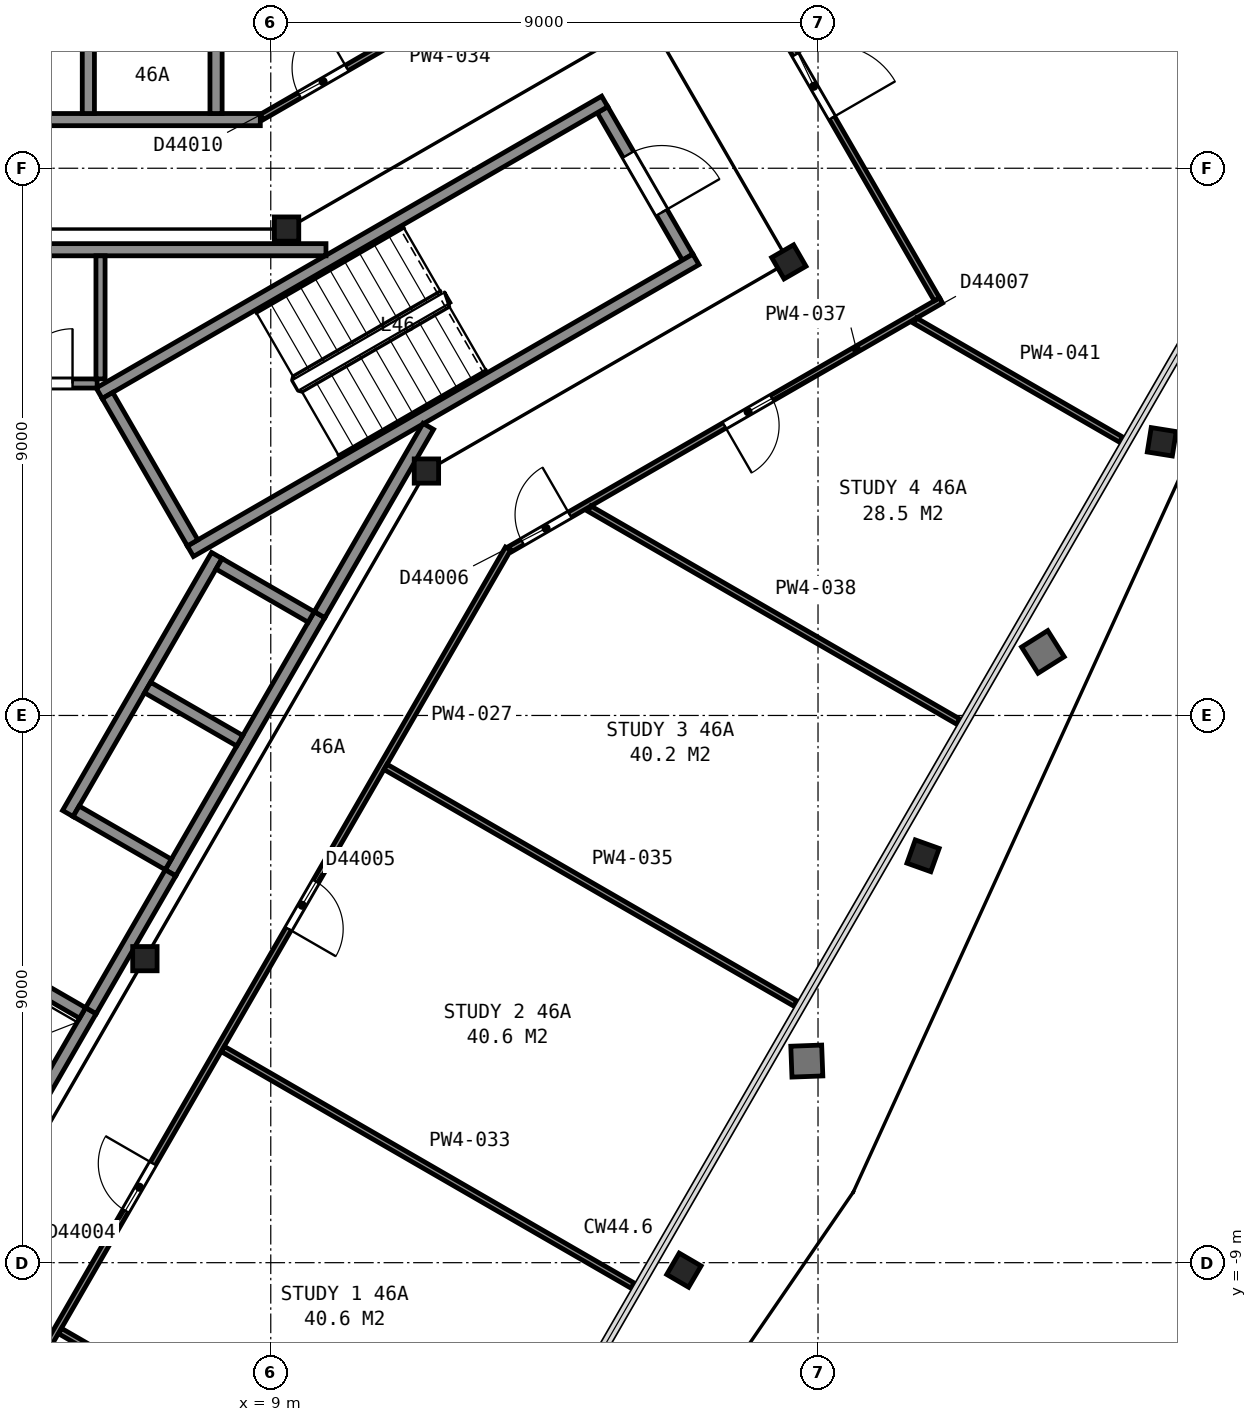
"""IFC4 building model, lengths in metres.
Left out: names, types, materials, properties, quantities, classifications, styles, units other than length and angle.
Written with IfcOpenShell. Run it as: python <this file> out.ifc"""

import sys

from ifc_helpers import new_model, si_unit, direction, frame, frame_2d, origin, origin_2d, place, context, subcontext, project, spatial, rectangle, i_section, extrude, element, fill, save


model = new_model("IFC4")
c1 = context("Model", 3, precision=1e-05, world=origin(), true_north=direction((0.0, 1.0)))
c2 = subcontext(c1, "Body", "Model", "MODEL_VIEW")
j1 = project(units=[si_unit("LENGTHUNIT", "METRE"), si_unit("PLANEANGLEUNIT", "RADIAN")], contexts=[c1])
p1 = place(None, origin())
s1 = spatial("IfcSite", under=j1, at=p1, CompositionType="ELEMENT")
p2 = place(p1, origin())
s2 = spatial("IfcBuilding", under=s1, at=p2, CompositionType="ELEMENT")
p3 = place(p2, frame((0.0, 0.0, 185.8)))
s3 = spatial("IfcBuildingStorey", under=s2, at=p3, CompositionType="ELEMENT", Elevation=185.8)
p4 = place(p3, frame((15.605, -9.013, 0.03), z_axis=(0.159333785609, -0.093016123912, 0.982833020129), x_axis=(-0.500289595457, -0.865857733626, -0.000840117374)))
e1 = element("IfcColumn", 1, at=p4, inside=s3, PredefinedType="COLUMN", context=c2, shape_type="SweptSolid", body=[
    extrude(i_section(OverallWidth=0.406, OverallDepth=0.417, WebThickness=0.03, FlangeThickness=0.048, FilletRadius=0.015, at=origin_2d()), origin(), (0.0, 0.0, 1.0), 3.703),
])
p5 = place(p3, frame((19.516, -2.232, 0.035), z_axis=(0.177790178515, -0.063666319498, 0.982006747525), x_axis=(-0.499620629348, -0.865563464331, 0.034338257757)))
e2 = element("IfcColumn", 2, at=p5, inside=s3, PredefinedType="COLUMN", context=c2, shape_type="SweptSolid", body=[
    extrude(i_section(OverallWidth=0.406, OverallDepth=0.417, WebThickness=0.03, FlangeThickness=0.048, FilletRadius=0.015, at=origin_2d()), origin(), (0.0, 0.0, 1.0), 3.697),
])
p6 = place(p3, frame((23.418, 4.539, 0.04), z_axis=(0.198532076657, -0.031778345714, 0.979579068418), x_axis=(-0.498721760227, -0.86367768571, 0.073057929632)))
e3 = element("IfcColumn", 3, at=p6, inside=s3, PredefinedType="COLUMN", context=c2, shape_type="SweptSolid", body=[
    extrude(i_section(OverallWidth=0.406, OverallDepth=0.417, WebThickness=0.03, FlangeThickness=0.048, FilletRadius=0.015, at=origin_2d()), origin(), (0.0, 0.0, 1.0), 3.695),
])
p7 = place(p3, frame((11.56, 4.02, 0.0), z_axis=(0.0, 0.0, 1.0), x_axis=(1.0, 0.0, 0.0)))
e4 = element("IfcColumn", 4, at=p7, inside=s3, PredefinedType="COLUMN", context=c2, shape_type="SweptSolid", body=[
    extrude(i_section(OverallWidth=0.401, OverallDepth=0.399, WebThickness=0.025, FlangeThickness=0.04, FilletRadius=0.015, at=origin_2d()), origin(), (0.0, 0.0, 1.0), 3.7),
])
p8 = place(p3, frame((17.52, 7.46, 0.0), z_axis=(0.0, 0.0, 1.0), x_axis=(0.5, -0.866025403784, 0.0)))
e5 = element("IfcColumn", 5, at=p8, inside=s3, PredefinedType="COLUMN", context=c2, shape_type="SweptSolid", body=[
    extrude(i_section(OverallWidth=0.406, OverallDepth=0.417, WebThickness=0.03, FlangeThickness=0.048, FilletRadius=0.015, at=origin_2d()), origin(), (0.0, 0.0, 1.0), 3.7),
])
for number, where, z_axis, x_axis in (
    (6, (9.26, 8.0, 0.0), (0.0, 0.0, 1.0), (1.0, 0.0, 0.0)),
    (7, (6.93, -4.0, 0.0), (0.0, 0.0, 1.0), (1.0, 0.0, 0.0)),
):
    element("IfcColumn", number, at=place(p3, frame(where, z_axis=z_axis, x_axis=x_axis)), inside=s3, PredefinedType="COLUMN", context=c2, shape_type="SweptSolid", body=[
        extrude(i_section(OverallWidth=0.401, OverallDepth=0.399, WebThickness=0.025, FlangeThickness=0.04, FilletRadius=0.015, at=origin_2d()), origin(), (0.0, 0.0, 1.0), 3.7),
    ])
p9 = place(p3, frame((15.855, 7.538, 0.0), z_axis=(0.0, 0.0, 1.0), x_axis=(-0.500049511043, 0.865996816683, 0.0)))
e8 = element("IfcWall", 8, at=p9, inside=s3, PredefinedType="PARTITIONING", context=c2, shape_type="SweptSolid", body=[
    extrude(rectangle(XDim=2.8, YDim=0.2, at=frame_2d((1.4, 0.0))), origin(), (0.0, 0.0, 1.0), 3.45),
])
p10 = place(p9, frame((0.85, 0.0, 0.0)))
e9 = element("IfcOpeningElement", 9, at=p10, cuts=e8, PredefinedType="OPENING", context=c2, shape_type="SweptSolid", body=[
    extrude(rectangle(XDim=1.1, YDim=2.1, at=frame_2d((0.55, 1.05))), frame((0.0, 0.11, 0.0), z_axis=(0.0, -1.0, 0.0), x_axis=(1.0, 0.0, 0.0)), (0.0, 0.0, 1.0), 0.22),
])
for number, where, z_axis, x_axis in (
    (10, (6.178, 5.299, 0.0), (0.0, 0.0, 1.0), (0.866, 0.5, 0.0)),
    (11, (7.678, 2.701, 0.0), (0.0, 0.0, 1.0), (0.866, 0.5, 0.0)),
):
    element("IfcWall", number, at=place(p3, frame(where, z_axis=z_axis, x_axis=x_axis)), inside=s3, PredefinedType="PARTITIONING", context=c2, shape_type="SweptSolid", body=[
        extrude(rectangle(XDim=9.6, YDim=0.2, at=frame_2d((4.8, 0.0))), origin(), (0.0, 0.0, 1.0), 3.45),
    ])
p11 = place(p3, frame((7.715, 2.838, 0.0), z_axis=(0.0, 0.0, 1.0), x_axis=(-0.500049511043, 0.865996816683, 0.0)))
e12 = element("IfcWall", 12, at=p11, inside=s3, PredefinedType="PARTITIONING", context=c2, shape_type="SweptSolid", body=[
    extrude(rectangle(XDim=2.8, YDim=0.2, at=frame_2d((1.4, 0.0))), origin(), (0.0, 0.0, 1.0), 3.45),
])
p12 = place(p3, frame((4.766, -7.065, 0.0), z_axis=(0.0, 0.0, 1.0), x_axis=(0.499948979701, 0.866054858364, 0.0)))
e13 = element("IfcWall", 13, at=p12, inside=s3, PredefinedType="PARTITIONING", context=c2, shape_type="SweptSolid", body=[
    extrude(rectangle(XDim=2.55, YDim=0.2, at=frame_2d((1.275, 0.0))), origin(), (0.0, 0.0, 1.0), 3.7),
])
p13 = place(p3, frame((7.351, -2.587, 0.0), z_axis=(0.0, 0.0, 1.0), x_axis=(0.500002801628, 0.866023786258, 0.0)))
e14 = element("IfcWall", 14, at=p13, inside=s3, PredefinedType="PARTITIONING", context=c2, shape_type="SweptSolid", body=[
    extrude(rectangle(XDim=4.9, YDim=0.2, at=frame_2d((2.45, 0.0))), origin(), (0.0, 0.0, 1.0), 3.7),
])
p14 = place(p3, frame((5.663, -1.612, 0.0), z_axis=(0.0, 0.0, 1.0), x_axis=(0.49998122708, 0.866036242063, 0.0)))
e15 = element("IfcWall", 15, at=p14, inside=s3, PredefinedType="PARTITIONING", context=c2, shape_type="SweptSolid", body=[
    extrude(rectangle(XDim=4.9, YDim=0.2, at=frame_2d((2.45, 0.0))), origin(), (0.0, 0.0, 1.0), 3.7),
])
p15 = place(p3, frame((9.665, 1.62, 0.0), z_axis=(0.0, 0.0, 1.0), x_axis=(-0.866002029911, 0.500040482552, 0.0)))
e16 = element("IfcWall", 16, at=p15, inside=s3, PredefinedType="PARTITIONING", context=c2, shape_type="SweptSolid", body=[
    extrude(rectangle(XDim=1.75, YDim=0.2, at=frame_2d((0.875, 0.0))), origin(), (0.0, 0.0, 1.0), 3.7),
])
for number, where, z_axis, x_axis in (
    (17, (8.49, -0.416, 0.0), (0.0, 0.0, 1.0), (-0.866, 0.5, 0.0)),
    (18, (7.315, -2.451, 0.0), (0.0, 0.0, 1.0), (-0.866, 0.5, 0.0)),
):
    element("IfcWall", number, at=place(p3, frame(where, z_axis=z_axis, x_axis=x_axis)), inside=s3, PredefinedType="PARTITIONING", context=c2, shape_type="SweptSolid", body=[
        extrude(rectangle(XDim=1.75, YDim=0.2, at=frame_2d((0.875, 0.0))), origin(), (0.0, 0.0, 1.0), 3.7),
    ])
p16 = place(p3, frame((5.905, -4.893, 0.0), z_axis=(0.0, 0.0, 1.0), x_axis=(-0.866002029911, 0.500040482552, 0.0)))
e19 = element("IfcWall", 19, at=p16, inside=s3, PredefinedType="PARTITIONING", context=c2, shape_type="SweptSolid", body=[
    extrude(rectangle(XDim=1.75, YDim=0.2, at=frame_2d((0.875, 0.0))), origin(), (0.0, 0.0, 1.0), 3.7),
])
p17 = place(p3, frame((-3.933, 7.66, 0.0), z_axis=(0.0, 0.0, 1.0), x_axis=(1.0, 0.0, 0.0)))
e20 = element("IfcWall", 20, at=p17, inside=s3, PredefinedType="PARTITIONING", context=c2, shape_type="SweptSolid", body=[
    extrude(rectangle(XDim=13.841, YDim=0.2, at=frame_2d((6.92, 0.0))), origin(), (0.0, 0.0, 1.0), 3.45),
])
p18 = place(p3, frame((0.925, 5.46, 0.0), z_axis=(0.0, 0.0, 1.0), x_axis=(1.0, 0.0, 0.0)))
e21 = element("IfcWall", 21, at=p18, inside=s3, PredefinedType="PARTITIONING", context=c2, shape_type="SweptSolid", body=[
    extrude(rectangle(XDim=5.22, YDim=0.15, at=frame_2d((2.61, 0.0))), origin(), (0.0, 0.0, 1.0), 3.45),
])
p19 = place(p18, frame((3.915, 0.0, 0.0)))
e22 = element("IfcOpeningElement", 22, at=p19, cuts=e21, PredefinedType="OPENING", context=c2, shape_type="SweptSolid", body=[
    extrude(rectangle(XDim=0.9, YDim=2.1, at=frame_2d((0.45, 1.05))), frame((0.0, 0.085, 0.0), z_axis=(0.0, -1.0, 0.0), x_axis=(1.0, 0.0, 0.0)), (0.0, 0.0, 1.0), 0.17),
])
p20 = place(p3, frame((6.042, -4.855, 0.0), z_axis=(0.0, 0.0, 1.0), x_axis=(0.500252727967, 0.865879442048, 0.0)))
e23 = element("IfcWall", 23, at=p20, inside=s3, PredefinedType="PARTITIONING", context=c2, shape_type="SweptSolid", body=[
    extrude(rectangle(XDim=2.617, YDim=0.2, at=frame_2d((1.309, 0.0))), origin(), (0.0, 0.0, 1.0), 3.45),
])
p21 = place(p3, frame((6.2, 5.535, 0.0), z_axis=(0.0, 0.0, 1.0), x_axis=(0.0, 1.0, 0.0)))
e24 = element("IfcWall", 24, at=p21, inside=s3, PredefinedType="PARTITIONING", context=c2, shape_type="SweptSolid", body=[
    extrude(rectangle(XDim=2.025, YDim=0.15, at=frame_2d((1.013, 0.0))), origin(), (0.0, 0.0, 1.0), 3.45),
])
p22 = place(p3, frame((9.803, 1.658, 0.0), z_axis=(0.0, 0.0, 1.0), x_axis=(0.499943114462, 0.866058244174, 0.0)))
e25 = element("IfcWall", 25, at=p22, inside=s3, PredefinedType="PARTITIONING", context=c2, shape_type="SweptSolid", body=[
    extrude(rectangle(XDim=3.576, YDim=0.2, at=frame_2d((1.788, 0.0))), origin(), (0.0, 0.0, 1.0), 3.45),
])
p23 = place(p3, frame((-8.828, 9.8, 0.0), z_axis=(0.0, 0.0, 1.0), x_axis=(1.0, 0.0, 0.0)))
e26 = element("IfcWall", 26, at=p23, inside=s3, PredefinedType="PARTITIONING", context=c2, shape_type="SweptSolid", body=[
    extrude(rectangle(XDim=17.656, YDim=0.2, at=frame_2d((8.828, 0.0))), origin(), (0.0, 0.0, 1.0), 2.713),
])
p24 = place(p23, frame((11.723, 0.0, 0.0)))
e27 = element("IfcOpeningElement", 27, at=p24, cuts=e26, PredefinedType="OPENING", context=c2, shape_type="SweptSolid", body=[
    extrude(rectangle(XDim=0.9, YDim=2.1, at=frame_2d((0.45, 1.05))), frame((0.0, 0.11, 0.0), z_axis=(0.0, -1.0, 0.0), x_axis=(1.0, 0.0, 0.0)), (0.0, 0.0, 1.0), 0.22),
])
p25 = place(p23, frame((6.367, 0.0, 0.0)))
e28 = element("IfcOpeningElement", 28, at=p25, cuts=e26, PredefinedType="OPENING", context=c2, shape_type="SweptSolid", body=[
    extrude(rectangle(XDim=0.9, YDim=2.1, at=frame_2d((0.45, 1.05))), frame((0.0, 0.11, 0.0), z_axis=(0.0, -1.0, 0.0), x_axis=(1.0, 0.0, 0.0)), (0.0, 0.0, 1.0), 0.22),
])
p26 = place(p3, frame((12.903, 2.745, 0.0), z_axis=(0.0, 0.0, 1.0), x_axis=(-0.499997333799, -0.866026943111, 0.0)))
e29 = element("IfcWall", 29, at=p26, inside=s3, PredefinedType="PARTITIONING", context=c2, shape_type="SweptSolid", body=[
    extrude(rectangle(XDim=17.606, YDim=0.1, at=frame_2d((8.803, 0.0))), origin(), (0.0, 0.0, 1.0), 2.713),
])
p27 = place(p26, frame((15.756, 0.0, 0.0)))
e30 = element("IfcOpeningElement", 30, at=p27, cuts=e29, PredefinedType="OPENING", context=c2, shape_type="SweptSolid", body=[
    extrude(rectangle(XDim=0.9, YDim=2.1, at=frame_2d((0.45, 1.05))), frame((0.0, 0.06, 0.0), z_axis=(0.0, -1.0, 0.0), x_axis=(1.0, 0.0, 0.0)), (0.0, 0.0, 1.0), 0.12),
])
p28 = place(p26, frame((11.679, 0.0, 0.0)))
e31 = element("IfcOpeningElement", 31, at=p28, cuts=e29, PredefinedType="OPENING", context=c2, shape_type="SweptSolid", body=[
    extrude(rectangle(XDim=0.9, YDim=2.1, at=frame_2d((0.45, 1.05))), frame((0.0, 0.06, 0.0), z_axis=(0.0, -1.0, 0.0), x_axis=(1.0, 0.0, 0.0)), (0.0, 0.0, 1.0), 0.12),
])
p29 = place(p26, frame((6.324, 0.0, 0.0)))
e32 = element("IfcOpeningElement", 32, at=p29, cuts=e29, PredefinedType="OPENING", context=c2, shape_type="SweptSolid", body=[
    extrude(rectangle(XDim=0.9, YDim=2.1, at=frame_2d((0.45, 1.05))), frame((0.0, 0.06, 0.0), z_axis=(0.0, -1.0, 0.0), x_axis=(1.0, 0.0, 0.0)), (0.0, 0.0, 1.0), 0.12),
])
p30 = place(p3, frame((5.536, -10.125, 0.0), z_axis=(0.0, 0.0, 1.0), x_axis=(0.866044474677, -0.49996696679, 0.0)))
e33 = element("IfcWall", 33, at=p30, inside=s3, PredefinedType="PARTITIONING", context=c2, shape_type="SweptSolid", body=[
    extrude(rectangle(XDim=7.779, YDim=0.1, at=frame_2d((3.889, 0.0))), origin(), (0.0, 0.0, 1.0), 2.713),
])
p31 = place(p3, frame((6.0, 9.9, 0.0), z_axis=(0.0, 0.0, 1.0), x_axis=(0.0, 1.0, 0.0)))
e34 = element("IfcWall", 34, at=p31, inside=s3, PredefinedType="PARTITIONING", context=c2, shape_type="SweptSolid", body=[
    extrude(rectangle(XDim=7.735, YDim=0.2, at=frame_2d((3.868, 0.0))), origin(), (0.0, 0.0, 1.0), 2.713),
])
p32 = place(p3, frame((8.1, 9.9, 0.0), z_axis=(0.0, 0.0, 1.0), x_axis=(0.0, 1.0, 0.0)))
e35 = element("IfcWall", 35, at=p32, inside=s3, PredefinedType="PARTITIONING", context=c2, shape_type="SweptSolid", body=[
    extrude(rectangle(XDim=2.842, YDim=0.2, at=frame_2d((1.421, 0.0))), origin(), (0.0, 0.0, 1.0), 2.713),
])
p33 = place(p3, frame((8.214, -5.487, 0.0), z_axis=(0.0, 0.0, 1.0), x_axis=(0.866007344409, -0.500031278452, 0.0)))
e36 = element("IfcWall", 36, at=p33, inside=s3, PredefinedType="PARTITIONING", context=c2, shape_type="SweptSolid", body=[
    extrude(rectangle(XDim=7.778, YDim=0.1, at=frame_2d((3.889, 0.0))), origin(), (0.0, 0.0, 1.0), 2.713),
])
p34 = place(p3, frame((8.852, 9.843, 0.0), z_axis=(0.0, 0.0, 1.0), x_axis=(0.866088973199, 0.499889878377, 0.0)))
e37 = element("IfcWall", 37, at=p34, inside=s3, PredefinedType="PARTITIONING", context=c2, shape_type="SweptSolid", body=[
    extrude(rectangle(XDim=8.163, YDim=0.1, at=frame_2d((4.082, 0.0))), origin(), (0.0, 0.0, 1.0), 2.713),
])
p35 = place(p34, frame((4.583, 0.0, 0.0)))
e38 = element("IfcOpeningElement", 38, at=p35, cuts=e37, PredefinedType="OPENING", context=c2, shape_type="SweptSolid", body=[
    extrude(rectangle(XDim=0.9, YDim=2.1, at=frame_2d((0.45, 1.05))), frame((0.0, 0.06, 0.0), z_axis=(0.0, -1.0, 0.0), x_axis=(1.0, 0.0, 0.0)), (0.0, 0.0, 1.0), 0.12),
])
p36 = place(p34, frame((0.715, 0.0, 0.0)))
e39 = element("IfcOpeningElement", 39, at=p36, cuts=e37, PredefinedType="OPENING", context=c2, shape_type="SweptSolid", body=[
    extrude(rectangle(XDim=0.9, YDim=2.1, at=frame_2d((0.45, 1.05))), frame((0.0, 0.06, 0.0), z_axis=(0.0, -1.0, 0.0), x_axis=(1.0, 0.0, 0.0)), (0.0, 0.0, 1.0), 0.12),
])
p37 = place(p3, frame((10.887, -0.846, 0.0), z_axis=(0.0, 0.0, 1.0), x_axis=(0.866004841997, -0.500035612369, 0.0)))
e40 = element("IfcWall", 40, at=p37, inside=s3, PredefinedType="PARTITIONING", context=c2, shape_type="SweptSolid", body=[
    extrude(rectangle(XDim=7.783, YDim=0.1, at=frame_2d((3.892, 0.0))), origin(), (0.0, 0.0, 1.0), 2.713),
])
p38 = place(p3, frame((20.023, 6.826, 0.0), z_axis=(0.0, 0.0, 1.0), x_axis=(-0.866097124975, -0.499875754673, 0.0)))
e41 = element("IfcWall", 41, at=p38, inside=s3, PredefinedType="PARTITIONING", context=c2, shape_type="SweptSolid", body=[
    extrude(rectangle(XDim=8.18, YDim=0.1, at=frame_2d((4.09, 0.0))), origin(), (0.0, 0.0, 1.0), 2.713),
])
p39 = place(p38, frame((7.05, 0.0, 0.0)))
e42 = element("IfcOpeningElement", 42, at=p39, cuts=e41, PredefinedType="OPENING", context=c2, shape_type="SweptSolid", body=[
    extrude(rectangle(XDim=0.9, YDim=2.1, at=frame_2d((0.45, 1.05))), frame((0.0, 0.06, 0.0), z_axis=(0.0, -1.0, 0.0), x_axis=(1.0, 0.0, 0.0)), (0.0, 0.0, 1.0), 0.12),
])
p40 = place(p38, frame((3.214, 0.0, 0.0)))
e43 = element("IfcOpeningElement", 43, at=p40, cuts=e41, PredefinedType="OPENING", context=c2, shape_type="SweptSolid", body=[
    extrude(rectangle(XDim=0.9, YDim=2.1, at=frame_2d((0.45, 1.05))), frame((0.0, 0.06, 0.0), z_axis=(0.0, -1.0, 0.0), x_axis=(1.0, 0.0, 0.0)), (0.0, 0.0, 1.0), 0.12),
])
p41 = place(p3, frame((14.24, 3.402, 0.0), z_axis=(0.0, 0.0, 1.0), x_axis=(0.866018390239, -0.500012147621, 0.0)))
e44 = element("IfcWall", 44, at=p41, inside=s3, PredefinedType="PARTITIONING", context=c2, shape_type="SweptSolid", body=[
    extrude(rectangle(XDim=7.003, YDim=0.1, at=frame_2d((3.501, 0.0))), origin(), (0.0, 0.0, 1.0), 2.713),
])
p42 = place(p3, frame((15.903, 13.855, 0.0), z_axis=(0.0, 0.0, 1.0), x_axis=(0.500415732313, -0.865785247537, 0.0)))
e45 = element("IfcWall", 45, at=p42, inside=s3, PredefinedType="PARTITIONING", context=c2, shape_type="SweptSolid", body=[
    extrude(rectangle(XDim=8.097, YDim=0.1, at=frame_2d((4.049, 0.0))), origin(), (0.0, 0.0, 1.0), 2.713),
])
p43 = place(p42, frame((3.45, 0.0, 0.0)))
e46 = element("IfcOpeningElement", 46, at=p43, cuts=e45, PredefinedType="OPENING", context=c2, shape_type="SweptSolid", body=[
    extrude(rectangle(XDim=1.2, YDim=2.1, at=frame_2d((0.6, 1.05))), frame((0.0, 0.06, 0.0), z_axis=(0.0, -1.0, 0.0), x_axis=(1.0, 0.0, 0.0)), (0.0, 0.0, 1.0), 0.12),
])
p44 = place(p3, frame((19.596, 6.494, 0.0), z_axis=(0.0, 0.0, 1.0), x_axis=(0.865998449813, -0.500046682742, 0.0)))
e47 = element("IfcWall", 47, at=p44, inside=s3, PredefinedType="PARTITIONING", context=c2, shape_type="SweptSolid", body=[
    extrude(rectangle(XDim=3.911, YDim=0.1, at=frame_2d((1.956, 0.0))), origin(), (0.0, 0.0, 1.0), 2.713),
])
p45 = place(p10, origin())
e48 = element("IfcDoor", 48, at=p45, inside=s3, OperationType="SINGLE_SWING_LEFT", PredefinedType="DOOR", context=c2, shape_type="SweptSolid", body=[
    extrude(rectangle(XDim=1.1, YDim=2.1, at=frame_2d((0.55, 1.05))), frame((0.0, 0.025, 0.0), z_axis=(0.0, -1.0, 0.0), x_axis=(1.0, 0.0, 0.0)), (0.0, 0.0, 1.0), 0.05),
])
fill(e9, e48)
p46 = place(p19, origin())
e49 = element("IfcDoor", 49, at=p46, inside=s3, OperationType="SINGLE_SWING_RIGHT", PredefinedType="DOOR", context=c2, shape_type="SweptSolid", body=[
    extrude(rectangle(XDim=0.9, YDim=2.1, at=frame_2d((0.45, 1.05))), frame((0.0, 0.025, 0.0), z_axis=(0.0, -1.0, 0.0), x_axis=(1.0, 0.0, 0.0)), (0.0, 0.0, 1.0), 0.05),
])
fill(e22, e49)
p47 = place(p28, origin())
e50 = element("IfcDoor", 50, at=p47, inside=s3, OperationType="SINGLE_SWING_LEFT", PredefinedType="DOOR", context=c2, shape_type="SweptSolid", body=[
    extrude(rectangle(XDim=0.9, YDim=2.1, at=frame_2d((0.45, 1.05))), frame((0.0, 0.025, 0.0), z_axis=(0.0, -1.0, 0.0), x_axis=(1.0, 0.0, 0.0)), (0.0, 0.0, 1.0), 0.05),
])
fill(e31, e50)
p48 = place(p29, origin())
e51 = element("IfcDoor", 51, at=p48, inside=s3, OperationType="SINGLE_SWING_RIGHT", PredefinedType="DOOR", context=c2, shape_type="SweptSolid", body=[
    extrude(rectangle(XDim=0.9, YDim=2.1, at=frame_2d((0.45, 1.05))), frame((0.0, 0.025, 0.0), z_axis=(0.0, -1.0, 0.0), x_axis=(1.0, 0.0, 0.0)), (0.0, 0.0, 1.0), 0.05),
])
fill(e32, e51)
p49 = place(p36, origin())
e52 = element("IfcDoor", 52, at=p49, inside=s3, OperationType="SINGLE_SWING_RIGHT", PredefinedType="DOOR", context=c2, shape_type="SweptSolid", body=[
    extrude(rectangle(XDim=0.9, YDim=2.1, at=frame_2d((0.45, 1.05))), frame((0.0, 0.025, 0.0), z_axis=(0.0, -1.0, 0.0), x_axis=(1.0, 0.0, 0.0)), (0.0, 0.0, 1.0), 0.05),
])
fill(e39, e52)
p50 = place(p39, origin())
e53 = element("IfcDoor", 53, at=p50, inside=s3, OperationType="SINGLE_SWING_LEFT", PredefinedType="DOOR", context=c2, shape_type="SweptSolid", body=[
    extrude(rectangle(XDim=0.9, YDim=2.1, at=frame_2d((0.45, 1.05))), frame((0.0, 0.025, 0.0), z_axis=(0.0, -1.0, 0.0), x_axis=(1.0, 0.0, 0.0)), (0.0, 0.0, 1.0), 0.05),
])
fill(e42, e53)
p51 = place(p40, origin())
e54 = element("IfcDoor", 54, at=p51, inside=s3, OperationType="SINGLE_SWING_RIGHT", PredefinedType="DOOR", context=c2, shape_type="SweptSolid", body=[
    extrude(rectangle(XDim=0.9, YDim=2.1, at=frame_2d((0.45, 1.05))), frame((0.0, 0.025, 0.0), z_axis=(0.0, -1.0, 0.0), x_axis=(1.0, 0.0, 0.0)), (0.0, 0.0, 1.0), 0.05),
])
fill(e43, e54)
p52 = place(p43, origin())
e55 = element("IfcDoor", 55, at=p52, inside=s3, OperationType="SINGLE_SWING_RIGHT", PredefinedType="DOOR", context=c2, shape_type="SweptSolid", body=[
    extrude(rectangle(XDim=1.2, YDim=2.1, at=frame_2d((0.6, 1.05))), frame((0.0, 0.025, 0.0), z_axis=(0.0, -1.0, 0.0), x_axis=(1.0, 0.0, 0.0)), (0.0, 0.0, 1.0), 0.05),
])
fill(e46, e55)
save(model, sys.argv[1])
